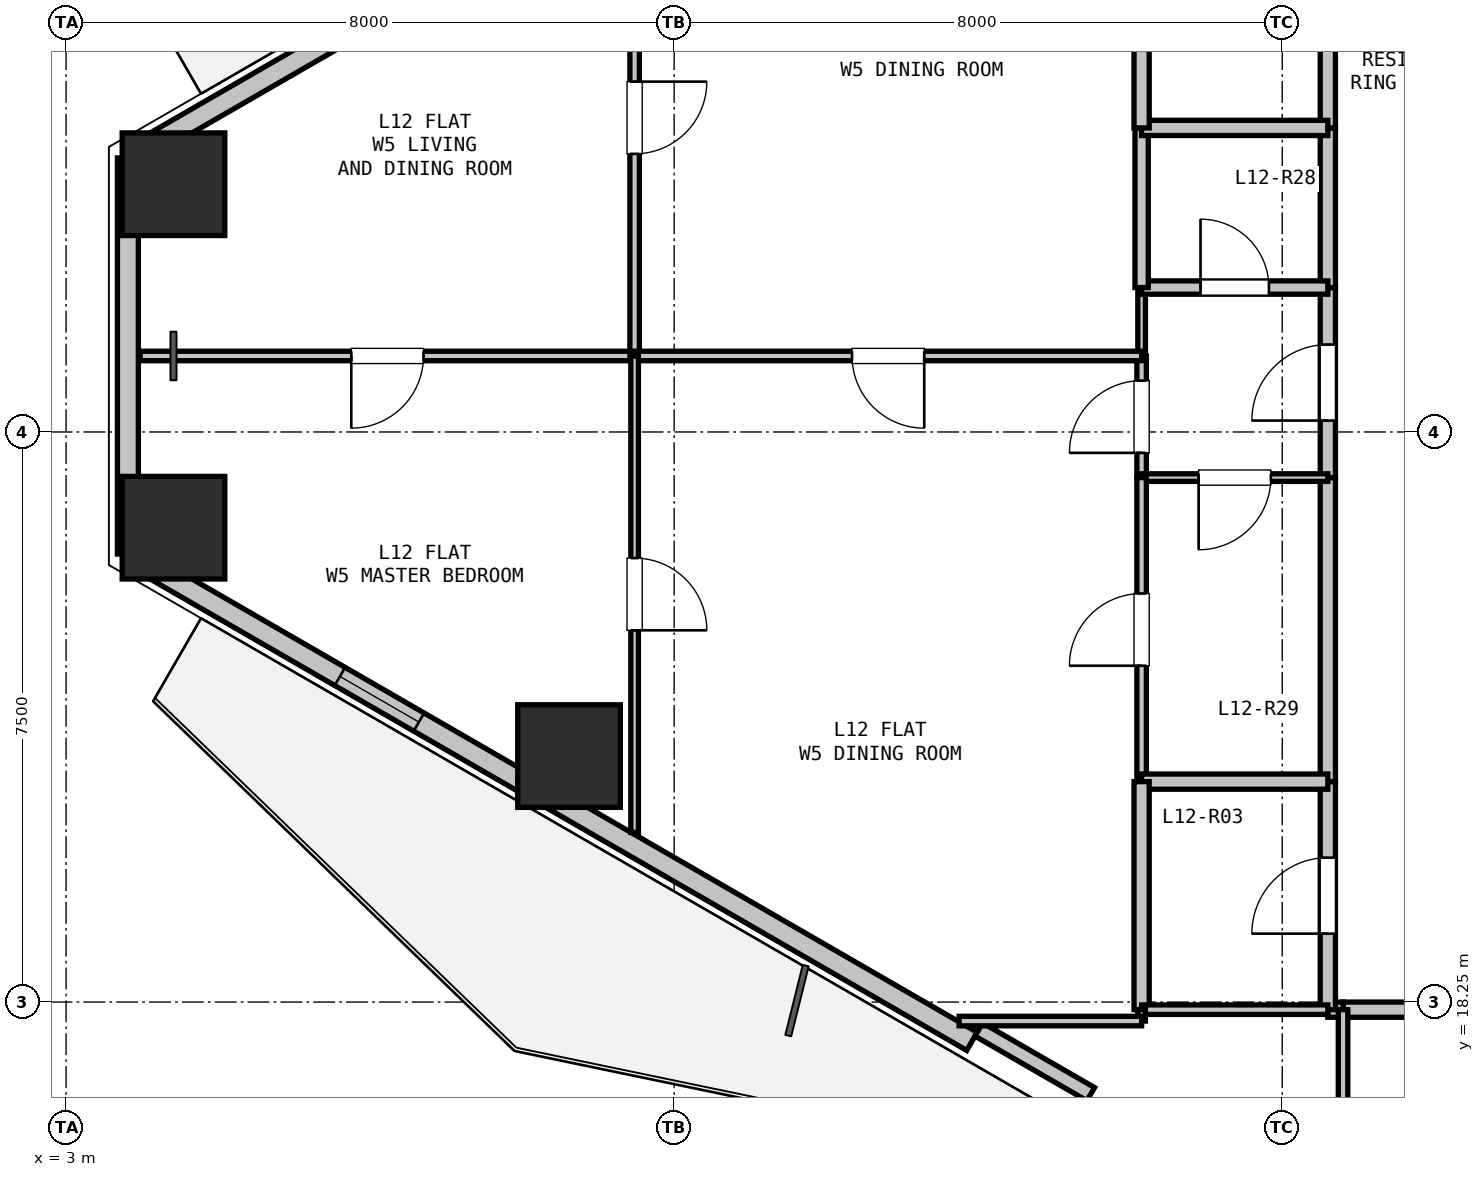
"""IFC4 building model, lengths in metres.
Left out: names, types, materials, properties, quantities, classifications, styles, units other than length and angle.
Written with IfcOpenShell. Run it as: python <this file> out.ifc"""

import sys

from ifc_helpers import new_model, si_unit, direction, frame, frame_2d, origin, origin_2d, place, context, subcontext, project, spatial, rectangle, hollow_rectangle, extrude, element, fill, save


model = new_model("IFC4")
c1 = context("Model", 3, precision=1e-05, world=origin(), true_north=direction((0.0, 1.0)))
c2 = subcontext(c1, "Body", "Model", "MODEL_VIEW")
j1 = project(units=[si_unit("LENGTHUNIT", "METRE"), si_unit("PLANEANGLEUNIT", "RADIAN")], contexts=[c1])
p1 = place(None, origin())
s1 = spatial("IfcSite", under=j1, at=p1, CompositionType="ELEMENT")
p2 = place(p1, origin())
s2 = spatial("IfcBuilding", under=s1, at=p2, CompositionType="ELEMENT")
p3 = place(p2, frame((0.0, 0.0, 45.6)))
s3 = spatial("IfcBuildingStorey", under=s2, at=p3, CompositionType="ELEMENT", Elevation=45.6)
for number, where, z_axis, x_axis in (
    (1, (4.413, 29.009, 0.0), (0.0, 0.0, 1.0), (1.0, 0.0, 0.0)),
    (2, (9.617, 21.486, 0.0), (0.0, 0.0, 1.0), (1.0, 0.0, 0.0)),
    (3, (4.413, 24.491, 0.0), (0.0, 0.0, 1.0), (1.0, 0.0, 0.0)),
):
    element("IfcColumn", number, at=place(p3, frame(where, z_axis=z_axis, x_axis=x_axis)), inside=s3, PredefinedType="COLUMN", context=c2, shape_type="SweptSolid", body=[
        extrude(hollow_rectangle(XDim=1.35, YDim=1.35, WallThickness=0.036, at=origin_2d()), origin(), (0.0, 0.0, 1.0), 3.3),
    ])
p4 = place(p3, frame((3.813, 24.144, 0.0), z_axis=(0.0, 0.0, 1.0), x_axis=(0.0, 1.0, 0.0)))
e4 = element("IfcWall", 4, at=p4, inside=s3, PredefinedType="SOLIDWALL", context=c2, shape_type="SweptSolid", body=[
    extrude(rectangle(XDim=5.211, YDim=0.275, at=frame_2d((2.606, 0.0))), origin(), (0.0, 0.0, 1.0), 2.66),
])
p5 = place(p3, frame((3.943, 29.431, 0.0), z_axis=(0.0, 0.0, 1.0), x_axis=(0.866027105532, 0.499997052475, 0.0)))
e5 = element("IfcWall", 5, at=p5, inside=s3, PredefinedType="SOLIDWALL", context=c2, shape_type="SweptSolid", body=[
    extrude(rectangle(XDim=12.673, YDim=0.275, at=frame_2d((6.336, 0.0))), origin(), (0.0, 0.0, 1.0), 2.66),
])
p6 = place(p5, frame((9.298, 0.0, 0.0)))
e6 = element("IfcOpeningElement", 6, at=p6, cuts=e5, PredefinedType="OPENING", context=c2, shape_type="SweptSolid", body=[
    extrude(rectangle(XDim=1.1, YDim=2.1, at=frame_2d((0.55, 1.05))), frame((0.0, 0.147, 0.0), z_axis=(0.0, -1.0, 0.0), x_axis=(1.0, 0.0, 0.0)), (0.0, 0.0, 1.0), 0.295),
])
p7 = place(p3, frame((14.918, 17.733, 0.0), z_axis=(0.0, 0.0, 1.0), x_axis=(-0.866027105532, 0.499997052475, 0.0)))
e7 = element("IfcWall", 7, at=p7, inside=s3, PredefinedType="SOLIDWALL", context=c2, shape_type="SweptSolid", body=[
    extrude(rectangle(XDim=12.673, YDim=0.275, at=frame_2d((6.336, 0.0))), origin(), (0.0, 0.0, 1.0), 2.66),
])
p8 = place(p7, frame((8.402, 0.0, 0.9)))
e8 = element("IfcOpeningElement", 8, at=p8, cuts=e7, PredefinedType="OPENING", context=c2, shape_type="SweptSolid", body=[
    extrude(rectangle(XDim=1.2, YDim=1.4, at=frame_2d((0.6, 0.7))), frame((0.0, 0.147, 0.0), z_axis=(0.0, -1.0, 0.0), x_axis=(1.0, 0.0, 0.0)), (0.0, 0.0, 1.0), 0.295),
])
p9 = place(p3, frame((16.48, 17.039, 0.0), z_axis=(0.0, 0.0, 1.0), x_axis=(-0.86605165483, 0.499954529098, 0.0)))
e9 = element("IfcWall", 9, at=p9, inside=s3, PredefinedType="PARAPET", context=c2, shape_type="SweptSolid", body=[
    extrude(rectangle(XDim=1.7, YDim=0.2, at=frame_2d((0.85, 0.0))), origin(), (0.0, 0.0, 1.0), 2.66),
])
p10 = place(p3, frame((22.6, 18.15, 0.0), z_axis=(0.0, 0.0, 1.0), x_axis=(-1.0, 0.0, 0.0)))
e10 = element("IfcWall", 10, at=p10, inside=s3, PredefinedType="PARTITIONING", context=c2, shape_type="SweptSolid", body=[
    extrude(rectangle(XDim=2.8, YDim=0.2, at=frame_2d((1.4, 0.0))), origin(), (0.0, 0.0, 1.0), 3.04),
])
p11 = place(p10, frame((0.9, 0.0, 0.0)))
e11 = element("IfcOpeningElement", 11, at=p11, cuts=e10, PredefinedType="OPENING", context=c2, shape_type="SweptSolid", body=[
    extrude(rectangle(XDim=1.0, YDim=2.15, at=frame_2d((0.5, 1.075))), frame((0.0, 0.11, 0.0), z_axis=(0.0, -1.0, 0.0), x_axis=(1.0, 0.0, 0.0)), (0.0, 0.0, 1.0), 0.22),
])
p12 = place(p3, frame((19.8, 18.15, 0.0), z_axis=(0.0, 0.0, 1.0), x_axis=(-1.0, 0.0, 0.0)))
e12 = element("IfcWall", 12, at=p12, inside=s3, PredefinedType="PARTITIONING", context=c2, shape_type="SweptSolid", body=[
    extrude(rectangle(XDim=0.2, YDim=0.2, at=frame_2d((0.1, 0.0))), origin(), (0.0, 0.0, 1.0), 3.04),
])
p13 = place(p3, frame((19.6, 18.15, 0.0), z_axis=(0.0, 0.0, 1.0), x_axis=(0.0, 1.0, 0.0)))
e13 = element("IfcWall", 13, at=p13, inside=s3, PredefinedType="PARTITIONING", context=c2, shape_type="SweptSolid", body=[
    extrude(rectangle(XDim=3.0, YDim=0.2, at=frame_2d((1.5, 0.0))), origin(), (0.0, 0.0, 1.0), 2.337),
])
p14 = place(p13, frame((1.0, 0.0, 0.0)))
e14 = element("IfcOpeningElement", 14, at=p14, cuts=e13, PredefinedType="OPENING", context=c2, shape_type="SweptSolid", body=[
    extrude(rectangle(XDim=1.0, YDim=2.15, at=frame_2d((0.5, 1.075))), frame((0.0, 0.11, 0.0), z_axis=(0.0, -1.0, 0.0), x_axis=(1.0, 0.0, 0.0)), (0.0, 0.0, 1.0), 0.22),
])
p15 = place(p3, frame((19.6, 21.15, 0.0), z_axis=(0.0, 0.0, 1.0), x_axis=(0.0, 1.0, 0.0)))
e15 = element("IfcWall", 15, at=p15, inside=s3, PredefinedType="PARTITIONING", context=c2, shape_type="SweptSolid", body=[
    extrude(rectangle(XDim=4.0, YDim=0.2, at=frame_2d((2.0, 0.0))), origin(), (0.0, 0.0, 1.0), 3.04),
])
p16 = place(p3, frame((19.6, 25.15, 0.0), z_axis=(0.0, 0.0, 1.0), x_axis=(0.0, 1.0, 0.0)))
e16 = element("IfcWall", 16, at=p16, inside=s3, PredefinedType="PARTITIONING", context=c2, shape_type="SweptSolid", body=[
    extrude(rectangle(XDim=2.5, YDim=0.2, at=frame_2d((1.25, 0.0))), origin(), (0.0, 0.0, 1.0), 3.04),
])
p17 = place(p16, frame((0.75, 0.0, 0.0)))
e17 = element("IfcOpeningElement", 17, at=p17, cuts=e16, PredefinedType="OPENING", context=c2, shape_type="SweptSolid", body=[
    extrude(rectangle(XDim=1.0, YDim=2.15, at=frame_2d((0.5, 1.075))), frame((0.0, 0.11, 0.0), z_axis=(0.0, -1.0, 0.0), x_axis=(1.0, 0.0, 0.0)), (0.0, 0.0, 1.0), 0.22),
])
p18 = place(p3, frame((19.6, 27.65, 0.0), z_axis=(0.0, 0.0, 1.0), x_axis=(0.0, 1.0, 0.0)))
e18 = element("IfcWall", 18, at=p18, inside=s3, PredefinedType="PARTITIONING", context=c2, shape_type="SweptSolid", body=[
    extrude(rectangle(XDim=2.1, YDim=0.2, at=frame_2d((1.05, 0.0))), origin(), (0.0, 0.0, 1.0), 3.04),
])
p19 = place(p3, frame((19.6, 29.75, 0.0), z_axis=(0.0, 0.0, 1.0), x_axis=(0.0, 1.0, 0.0)))
e19 = element("IfcWall", 19, at=p19, inside=s3, PredefinedType="PARTITIONING", context=c2, shape_type="SweptSolid", body=[
    extrude(rectangle(XDim=5.6, YDim=0.2, at=frame_2d((2.8, 0.0))), origin(), (0.0, 0.0, 1.0), 2.337),
])
p20 = place(p19, frame((2.3, 0.0, 0.0)))
e20 = element("IfcOpeningElement", 20, at=p20, cuts=e19, PredefinedType="OPENING", context=c2, shape_type="SweptSolid", body=[
    extrude(rectangle(XDim=1.0, YDim=2.15, at=frame_2d((0.5, 1.075))), frame((0.0, 0.11, 0.0), z_axis=(0.0, -1.0, 0.0), x_axis=(1.0, 0.0, 0.0)), (0.0, 0.0, 1.0), 0.22),
])
p21 = place(p3, frame((17.15, 25.15, 0.0), z_axis=(0.0, 0.0, 1.0), x_axis=(0.0, 1.0, 0.0)))
e21 = element("IfcWall", 21, at=p21, inside=s3, PredefinedType="PARTITIONING", context=c2, shape_type="SweptSolid", body=[
    extrude(rectangle(XDim=1.6, YDim=0.125, at=frame_2d((0.8, 0.0))), origin(), (0.0, 0.0, 1.0), 3.04),
])
p22 = place(p21, frame((0.325, 0.0, 0.0)))
e22 = element("IfcOpeningElement", 22, at=p22, cuts=e21, PredefinedType="OPENING", context=c2, shape_type="SweptSolid", body=[
    extrude(rectangle(XDim=0.95, YDim=2.1, at=frame_2d((0.475, 1.05))), frame((0.0, 0.073, 0.0), z_axis=(0.0, -1.0, 0.0), x_axis=(1.0, 0.0, 0.0)), (0.0, 0.0, 1.0), 0.145),
])
p23 = place(p3, frame((17.15, 26.75, 0.0), z_axis=(0.0, 0.0, 1.0), x_axis=(0.0, 1.0, 0.0)))
e23 = element("IfcWall", 23, at=p23, inside=s3, PredefinedType="PARTITIONING", context=c2, shape_type="SweptSolid", body=[
    extrude(rectangle(XDim=0.9, YDim=0.1, at=frame_2d((0.45, 0.0))), origin(), (0.0, 0.0, 1.0), 3.04),
])
p24 = place(p3, frame((17.15, 27.65, 0.0), z_axis=(0.0, 0.0, 1.0), x_axis=(1.0, 0.0, 0.0)))
e24 = element("IfcWall", 24, at=p24, inside=s3, PredefinedType="PLUMBINGWALL", context=c2, shape_type="SweptSolid", body=[
    extrude(rectangle(XDim=2.45, YDim=0.175, at=frame_2d((1.225, 0.0))), origin(), (0.0, 0.0, 1.0), 3.04),
])
p25 = place(p24, frame((0.775, 0.0, 0.0)))
e25 = element("IfcOpeningElement", 25, at=p25, cuts=e24, PredefinedType="OPENING", context=c2, shape_type="SweptSolid", body=[
    extrude(rectangle(XDim=0.9, YDim=2.1, at=frame_2d((0.45, 1.05))), frame((0.0, 0.097, 0.0), z_axis=(0.0, -1.0, 0.0), x_axis=(1.0, 0.0, 0.0)), (0.0, 0.0, 1.0), 0.195),
])
p26 = place(p3, frame((19.6, 25.15, 0.0), z_axis=(0.0, 0.0, 1.0), x_axis=(-1.0, 0.0, 0.0)))
e26 = element("IfcWall", 26, at=p26, inside=s3, PredefinedType="PARTITIONING", context=c2, shape_type="SweptSolid", body=[
    extrude(rectangle(XDim=2.45, YDim=0.1, at=frame_2d((1.225, 0.0))), origin(), (0.0, 0.0, 1.0), 3.04),
])
p27 = place(p26, frame((0.75, 0.0, 0.0)))
e27 = element("IfcOpeningElement", 27, at=p27, cuts=e26, PredefinedType="OPENING", context=c2, shape_type="SweptSolid", body=[
    extrude(rectangle(XDim=0.95, YDim=2.1, at=frame_2d((0.475, 1.05))), frame((0.0, 0.06, 0.0), z_axis=(0.0, -1.0, 0.0), x_axis=(1.0, 0.0, 0.0)), (0.0, 0.0, 1.0), 0.12),
])
p28 = place(p3, frame((17.15, 27.65, 0.0), z_axis=(0.0, 0.0, 1.0), x_axis=(0.0, 1.0, 0.0)))
e28 = element("IfcWall", 28, at=p28, inside=s3, PredefinedType="PLUMBINGWALL", context=c2, shape_type="SweptSolid", body=[
    extrude(rectangle(XDim=2.1, YDim=0.175, at=frame_2d((1.05, 0.0))), origin(), (0.0, 0.0, 1.0), 3.04),
])
p29 = place(p3, frame((17.15, 29.75, 0.0), z_axis=(0.0, 0.0, 1.0), x_axis=(1.0, 0.0, 0.0)))
e29 = element("IfcWall", 29, at=p29, inside=s3, PredefinedType="PARTITIONING", context=c2, shape_type="SweptSolid", body=[
    extrude(rectangle(XDim=2.45, YDim=0.2, at=frame_2d((1.225, 0.0))), origin(), (0.0, 0.0, 1.0), 3.04),
])
p30 = place(p3, frame((17.15, 21.15, 0.0), z_axis=(0.0, 0.0, 1.0), x_axis=(0.0, 1.0, 0.0)))
e30 = element("IfcWall", 30, at=p30, inside=s3, PredefinedType="PARTITIONING", context=c2, shape_type="SweptSolid", body=[
    extrude(rectangle(XDim=4.0, YDim=0.125, at=frame_2d((2.0, 0.0))), origin(), (0.0, 0.0, 1.0), 2.337),
])
p31 = place(p30, frame((1.525, 0.0, 0.0)))
e31 = element("IfcOpeningElement", 31, at=p31, cuts=e30, PredefinedType="OPENING", context=c2, shape_type="SweptSolid", body=[
    extrude(rectangle(XDim=0.95, YDim=2.1, at=frame_2d((0.475, 1.05))), frame((0.0, 0.073, 0.0), z_axis=(0.0, -1.0, 0.0), x_axis=(1.0, 0.0, 0.0)), (0.0, 0.0, 1.0), 0.145),
])
p32 = place(p3, frame((19.6, 21.15, 0.0), z_axis=(0.0, 0.0, 1.0), x_axis=(-1.0, 0.0, 0.0)))
e32 = element("IfcWall", 32, at=p32, inside=s3, PredefinedType="PARTITIONING", context=c2, shape_type="SweptSolid", body=[
    extrude(rectangle(XDim=2.45, YDim=0.2, at=frame_2d((1.225, 0.0))), origin(), (0.0, 0.0, 1.0), 2.337),
])
p33 = place(p3, frame((17.15, 29.75, 0.0), z_axis=(0.0, 0.0, 1.0), x_axis=(0.0, 1.0, 0.0)))
e33 = element("IfcWall", 33, at=p33, inside=s3, PredefinedType="PARTITIONING", context=c2, shape_type="SweptSolid", body=[
    extrude(rectangle(XDim=5.6, YDim=0.2, at=frame_2d((2.8, 0.0))), origin(), (0.0, 0.0, 1.0), 2.337),
])
p34 = place(p3, frame((17.15, 18.15, 0.0), z_axis=(0.0, 0.0, 1.0), x_axis=(0.0, 1.0, 0.0)))
e34 = element("IfcWall", 34, at=p34, inside=s3, PredefinedType="PARTITIONING", context=c2, shape_type="SweptSolid", body=[
    extrude(rectangle(XDim=3.0, YDim=0.2, at=frame_2d((1.5, 0.0))), origin(), (0.0, 0.0, 1.0), 3.04),
])
p35 = place(p3, frame((19.6, 18.15, 0.0), z_axis=(0.0, 0.0, 1.0), x_axis=(-1.0, 0.0, 0.0)))
e35 = element("IfcWall", 35, at=p35, inside=s3, PredefinedType="PARTITIONING", context=c2, shape_type="SweptSolid", body=[
    extrude(rectangle(XDim=2.45, YDim=0.125, at=frame_2d((1.225, 0.0))), origin(), (0.0, 0.0, 1.0), 3.04),
])
p36 = place(p3, frame((19.8, 15.75, 0.0), z_axis=(0.0, 0.0, 1.0), x_axis=(0.0, 1.0, 0.0)))
e36 = element("IfcWall", 36, at=p36, inside=s3, PredefinedType="PARTITIONING", context=c2, shape_type="SweptSolid", body=[
    extrude(rectangle(XDim=2.4, YDim=0.125, at=frame_2d((1.2, 0.0))), origin(), (0.0, 0.0, 1.0), 2.65),
])
p37 = place(p3, frame((10.48, 26.75, 0.0), z_axis=(0.0, 0.0, 1.0), x_axis=(-1.0, 0.0, 0.0)))
e37 = element("IfcWall", 37, at=p37, inside=s3, PredefinedType="PARTITIONING", context=c2, shape_type="SweptSolid", body=[
    extrude(rectangle(XDim=6.505, YDim=0.125, at=frame_2d((3.253, 0.0))), origin(), (0.0, 0.0, 1.0), 2.65),
])
p38 = place(p37, frame((2.778, 0.0, 0.0)))
e38 = element("IfcOpeningElement", 38, at=p38, cuts=e37, PredefinedType="OPENING", context=c2, shape_type="SweptSolid", body=[
    extrude(rectangle(XDim=0.95, YDim=2.1, at=frame_2d((0.475, 1.05))), frame((0.0, 0.073, 0.0), z_axis=(0.0, -1.0, 0.0), x_axis=(1.0, 0.0, 0.0)), (0.0, 0.0, 1.0), 0.145),
])
p39 = place(p3, frame((3.813, 29.356, 0.0), z_axis=(0.0, 0.0, 1.0), x_axis=(0.866131372301, 0.499816412211, 0.0)))
e39 = element("IfcWall", 39, at=p39, inside=s3, PredefinedType="PARTITIONING", context=c2, shape_type="SweptSolid", body=[
    extrude(rectangle(XDim=0.15, YDim=0.1, at=frame_2d((0.075, 0.0))), origin(), (0.0, 0.0, 1.0), 3.04),
])
p40 = place(p3, frame((10.48, 33.018, 0.0), z_axis=(0.0, 0.0, 1.0), x_axis=(0.0, -1.0, 0.0)))
e40 = element("IfcWall", 40, at=p40, inside=s3, PredefinedType="PARTITIONING", context=c2, shape_type="SweptSolid", body=[
    extrude(rectangle(XDim=6.268, YDim=0.125, at=frame_2d((3.134, 0.0))), origin(), (0.0, 0.0, 1.0), 2.337),
])
p41 = place(p40, frame((2.659, 0.0, 0.0)))
e41 = element("IfcOpeningElement", 41, at=p41, cuts=e40, PredefinedType="OPENING", context=c2, shape_type="SweptSolid", body=[
    extrude(rectangle(XDim=0.95, YDim=2.1, at=frame_2d((0.475, 1.05))), frame((0.0, 0.073, 0.0), z_axis=(0.0, -1.0, 0.0), x_axis=(1.0, 0.0, 0.0)), (0.0, 0.0, 1.0), 0.145),
])
p42 = place(p3, frame((17.15, 26.75, 0.0), z_axis=(0.0, 0.0, 1.0), x_axis=(-1.0, 0.0, 0.0)))
e42 = element("IfcWall", 42, at=p42, inside=s3, PredefinedType="PARTITIONING", context=c2, shape_type="SweptSolid", body=[
    extrude(rectangle(XDim=6.67, YDim=0.125, at=frame_2d((3.335, 0.0))), origin(), (0.0, 0.0, 1.0), 3.04),
])
p43 = place(p42, frame((2.86, 0.0, 0.0)))
e43 = element("IfcOpeningElement", 43, at=p43, cuts=e42, PredefinedType="OPENING", context=c2, shape_type="SweptSolid", body=[
    extrude(rectangle(XDim=0.95, YDim=2.1, at=frame_2d((0.475, 1.05))), frame((0.0, 0.073, 0.0), z_axis=(0.0, -1.0, 0.0), x_axis=(1.0, 0.0, 0.0)), (0.0, 0.0, 1.0), 0.145),
])
p44 = place(p3, frame((10.48, 26.75, 0.0), z_axis=(0.0, 0.0, 1.0), x_axis=(0.0, -1.0, 0.0)))
e44 = element("IfcWall", 44, at=p44, inside=s3, PredefinedType="PARTITIONING", context=c2, shape_type="SweptSolid", body=[
    extrude(rectangle(XDim=6.268, YDim=0.1, at=frame_2d((3.134, 0.0))), origin(), (0.0, 0.0, 1.0), 2.337),
])
p45 = place(p44, frame((2.659, 0.0, 0.0)))
e45 = element("IfcOpeningElement", 45, at=p45, cuts=e44, PredefinedType="OPENING", context=c2, shape_type="SweptSolid", body=[
    extrude(rectangle(XDim=0.95, YDim=2.1, at=frame_2d((0.475, 1.05))), frame((0.0, 0.06, 0.0), z_axis=(0.0, -1.0, 0.0), x_axis=(1.0, 0.0, 0.0)), (0.0, 0.0, 1.0), 0.12),
])
p46 = place(p3, frame((3.943, 24.069, 0.0), z_axis=(0.0, 0.0, 1.0), x_axis=(-0.866131372301, 0.499816412211, 0.0)))
e46 = element("IfcWall", 46, at=p46, inside=s3, PredefinedType="PARTITIONING", context=c2, shape_type="SweptSolid", body=[
    extrude(rectangle(XDim=0.15, YDim=0.125, at=frame_2d((0.075, 0.0))), origin(), (0.0, 0.0, 1.0), 3.04),
])
p47 = place(p3, frame((17.15, 18.15, 0.0), z_axis=(0.0, 0.0, 1.0), x_axis=(0.0, -1.0, 0.0)))
e47 = element("IfcWall", 47, at=p47, inside=s3, PredefinedType="PARTITIONING", context=c2, shape_type="SweptSolid", body=[
    extrude(rectangle(XDim=0.15, YDim=0.1, at=frame_2d((0.075, 0.0))), origin(), (0.0, 0.0, 1.0), 3.04),
])
p48 = place(p3, frame((17.15, 18.0, 0.0), z_axis=(0.0, 0.0, 1.0), x_axis=(-1.0, 0.0, 0.0)))
e48 = element("IfcWall", 48, at=p48, inside=s3, PredefinedType="PARTITIONING", context=c2, shape_type="SweptSolid", body=[
    extrude(rectangle(XDim=2.401, YDim=0.125, at=frame_2d((1.2, 0.0))), origin(), (0.0, 0.0, 1.0), 2.365),
])
p49 = place(p8, origin())
e49 = element("IfcWindow", 49, at=p49, inside=s3, PartitioningType="SINGLE_PANEL", PredefinedType="WINDOW", context=c2, shape_type="SweptSolid", body=[
    extrude(rectangle(XDim=1.2, YDim=1.4, at=frame_2d((0.6, 0.7))), frame((0.0, 0.03, 0.0), z_axis=(0.0, -1.0, 0.0), x_axis=(1.0, 0.0, 0.0)), (0.0, 0.0, 1.0), 0.06),
])
fill(e8, e49)
p50 = place(p17, origin())
e50 = element("IfcDoor", 50, at=p50, inside=s3, OperationType="SINGLE_SWING_LEFT", PredefinedType="DOOR", context=c2, shape_type="SweptSolid", body=[
    extrude(rectangle(XDim=1.0, YDim=2.15, at=frame_2d((0.5, 1.075))), frame((0.0, 0.025, 0.0), z_axis=(0.0, -1.0, 0.0), x_axis=(1.0, 0.0, 0.0)), (0.0, 0.0, 1.0), 0.05),
])
fill(e17, e50)
p51 = place(p14, origin())
e51 = element("IfcDoor", 51, at=p51, inside=s3, OperationType="SINGLE_SWING_LEFT", PredefinedType="DOOR", context=c2, shape_type="SweptSolid", body=[
    extrude(rectangle(XDim=1.0, YDim=2.15, at=frame_2d((0.5, 1.075))), frame((0.0, 0.025, 0.0), z_axis=(0.0, -1.0, 0.0), x_axis=(1.0, 0.0, 0.0)), (0.0, 0.0, 1.0), 0.05),
])
fill(e14, e51)
p52 = place(p25, origin())
e52 = element("IfcDoor", 52, at=p52, inside=s3, OperationType="SINGLE_SWING_LEFT", PredefinedType="DOOR", context=c2, shape_type="SweptSolid", body=[
    extrude(rectangle(XDim=0.9, YDim=2.1, at=frame_2d((0.45, 1.05))), frame((0.0, 0.025, 0.0), z_axis=(0.0, -1.0, 0.0), x_axis=(1.0, 0.0, 0.0)), (0.0, 0.0, 1.0), 0.05),
])
fill(e25, e52)
p53 = place(p27, origin())
e53 = element("IfcDoor", 53, at=p53, inside=s3, OperationType="SINGLE_SWING_RIGHT", PredefinedType="DOOR", context=c2, shape_type="SweptSolid", body=[
    extrude(rectangle(XDim=0.95, YDim=2.1, at=frame_2d((0.475, 1.05))), frame((0.0, 0.025, 0.0), z_axis=(0.0, -1.0, 0.0), x_axis=(1.0, 0.0, 0.0)), (0.0, 0.0, 1.0), 0.05),
])
fill(e27, e53)
p54 = place(p22, origin())
e54 = element("IfcDoor", 54, at=p54, inside=s3, OperationType="SINGLE_SWING_LEFT", PredefinedType="DOOR", context=c2, shape_type="SweptSolid", body=[
    extrude(rectangle(XDim=0.95, YDim=2.1, at=frame_2d((0.475, 1.05))), frame((0.0, 0.025, 0.0), z_axis=(0.0, -1.0, 0.0), x_axis=(1.0, 0.0, 0.0)), (0.0, 0.0, 1.0), 0.05),
])
fill(e22, e54)
p55 = place(p31, origin())
e55 = element("IfcDoor", 55, at=p55, inside=s3, OperationType="SINGLE_SWING_LEFT", PredefinedType="DOOR", context=c2, shape_type="SweptSolid", body=[
    extrude(rectangle(XDim=0.95, YDim=2.1, at=frame_2d((0.475, 1.05))), frame((0.0, 0.025, 0.0), z_axis=(0.0, -1.0, 0.0), x_axis=(1.0, 0.0, 0.0)), (0.0, 0.0, 1.0), 0.05),
])
fill(e31, e55)
p56 = place(p41, origin())
e56 = element("IfcDoor", 56, at=p56, inside=s3, OperationType="SINGLE_SWING_LEFT", PredefinedType="DOOR", context=c2, shape_type="SweptSolid", body=[
    extrude(rectangle(XDim=0.95, YDim=2.1, at=frame_2d((0.475, 1.05))), frame((0.0, 0.025, 0.0), z_axis=(0.0, -1.0, 0.0), x_axis=(1.0, 0.0, 0.0)), (0.0, 0.0, 1.0), 0.05),
])
fill(e41, e56)
p57 = place(p38, origin())
e57 = element("IfcDoor", 57, at=p57, inside=s3, OperationType="SINGLE_SWING_RIGHT", PredefinedType="DOOR", context=c2, shape_type="SweptSolid", body=[
    extrude(rectangle(XDim=0.95, YDim=2.1, at=frame_2d((0.475, 1.05))), frame((0.0, 0.025, 0.0), z_axis=(0.0, -1.0, 0.0), x_axis=(1.0, 0.0, 0.0)), (0.0, 0.0, 1.0), 0.05),
])
fill(e38, e57)
p58 = place(p43, origin())
e58 = element("IfcDoor", 58, at=p58, inside=s3, OperationType="SINGLE_SWING_LEFT", PredefinedType="DOOR", context=c2, shape_type="SweptSolid", body=[
    extrude(rectangle(XDim=0.95, YDim=2.1, at=frame_2d((0.475, 1.05))), frame((0.0, 0.025, 0.0), z_axis=(0.0, -1.0, 0.0), x_axis=(1.0, 0.0, 0.0)), (0.0, 0.0, 1.0), 0.05),
])
fill(e43, e58)
p59 = place(p45, origin())
e59 = element("IfcDoor", 59, at=p59, inside=s3, OperationType="SINGLE_SWING_RIGHT", PredefinedType="DOOR", context=c2, shape_type="SweptSolid", body=[
    extrude(rectangle(XDim=0.95, YDim=2.1, at=frame_2d((0.475, 1.05))), frame((0.0, 0.025, 0.0), z_axis=(0.0, -1.0, 0.0), x_axis=(1.0, 0.0, 0.0)), (0.0, 0.0, 1.0), 0.05),
])
fill(e45, e59)
save(model, sys.argv[1])
